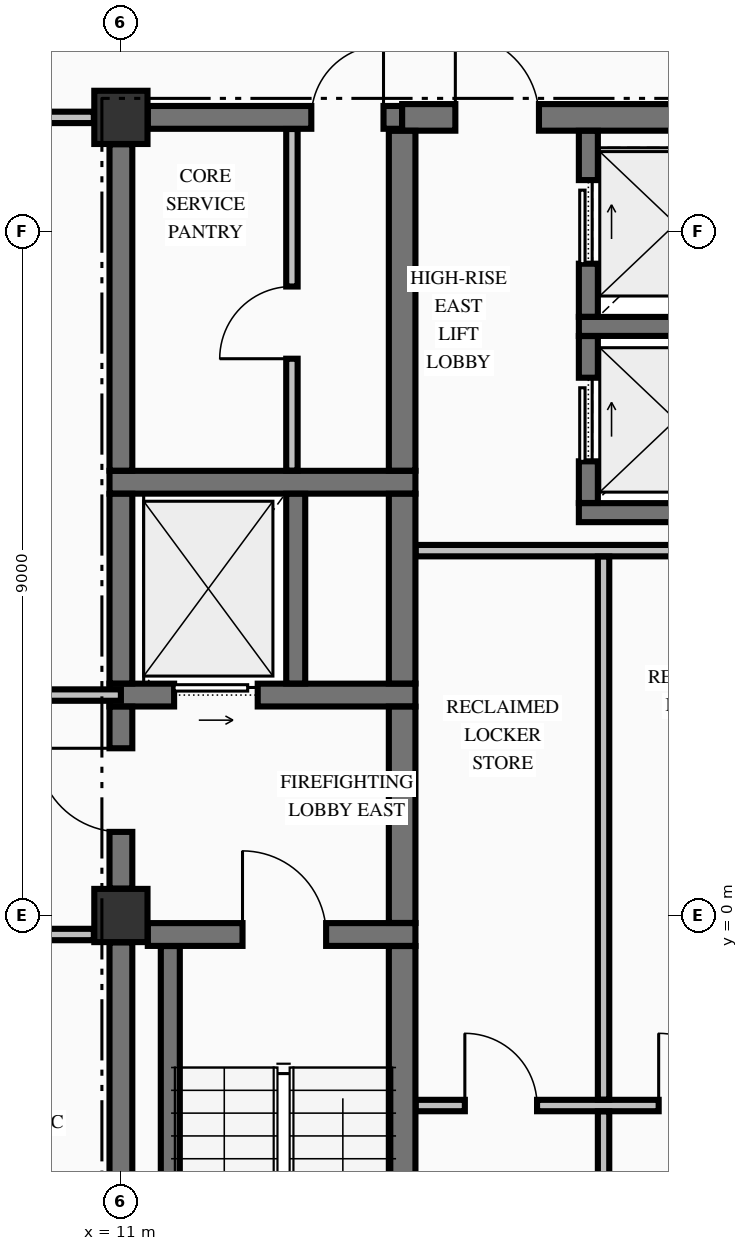
"""IFC4 building model, lengths in metres.
Left out: names, types, materials, properties, quantities, classifications, styles, units other than length and angle.
Written with IfcOpenShell. Run it as: python <this file> out.ifc"""

import sys

from ifc_helpers import new_model, si_unit, direction, frame, frame_2d, origin, origin_2d, place, context, subcontext, project, spatial, rectangle, extrude, element, fill, save


model = new_model("IFC4")
c1 = context("Model", 3, precision=1e-05, world=origin(), true_north=direction((0.0, 1.0)))
c2 = subcontext(c1, "Body", "Model", "MODEL_VIEW")
j1 = project(units=[si_unit("LENGTHUNIT", "METRE"), si_unit("PLANEANGLEUNIT", "RADIAN")], contexts=[c1])
p1 = place(None, origin())
s1 = spatial("IfcSite", under=j1, at=p1, CompositionType="ELEMENT")
p2 = place(p1, origin())
s2 = spatial("IfcBuilding", under=s1, at=p2, CompositionType="ELEMENT")
p3 = place(p2, frame((0.0, 0.0, 230.05)))
s3 = spatial("IfcBuildingStorey", under=s2, at=p3, CompositionType="ELEMENT", Elevation=230.05)
for number, where, z_axis, x_axis in (
    (1, (11.0, 0.0, -0.25), (0.0, 0.0, 1.0), (1.0, 0.0, 0.0)),
    (2, (11.0, 10.5, -0.25), (0.0, 0.0, 1.0), (1.0, 0.0, 0.0)),
):
    element("IfcColumn", number, at=place(p3, frame(where, z_axis=z_axis, x_axis=x_axis)), inside=s3, PredefinedType="COLUMN", context=c2, shape_type="SweptSolid", body=[
        extrude(rectangle(XDim=0.7, YDim=0.7, at=origin_2d()), origin(), (0.0, 0.0, 1.0), 3.23),
    ])
p4 = place(p3, frame((11.354, -0.25, 0.0), z_axis=(0.0, 0.0, 1.0), x_axis=(1.0, 0.0, 0.0)))
e3 = element("IfcWall", 3, at=p4, inside=s3, PredefinedType="SHEAR", context=c2, shape_type="SweptSolid", body=[
    extrude(rectangle(XDim=3.521, YDim=0.3, at=frame_2d((1.76, 0.0))), origin(), (0.0, 0.0, 1.0), 2.98),
])
p5 = place(p4, frame((1.246, 0.0, 0.0)))
e4 = element("IfcOpeningElement", 4, at=p5, cuts=e3, PredefinedType="OPENING", context=c2, shape_type="SweptSolid", body=[
    extrude(rectangle(XDim=1.1, YDim=2.15, at=frame_2d((0.55, 1.075))), frame((0.0, 0.16, 0.0), z_axis=(0.0, -1.0, 0.0), x_axis=(1.0, 0.0, 0.0)), (0.0, 0.0, 1.0), 0.32),
])
p6 = place(p3, frame((10.85, 2.9, 0.0), z_axis=(0.0, 0.0, 1.0), x_axis=(1.0, 0.0, 0.0)))
e5 = element("IfcWall", 5, at=p6, inside=s3, PredefinedType="SHEAR", context=c2, shape_type="SweptSolid", body=[
    extrude(rectangle(XDim=4.025, YDim=0.3, at=frame_2d((2.012, 0.0))), origin(), (0.0, 0.0, 1.0), 2.98),
])
p7 = place(p6, frame((0.85, 0.0, 0.0)))
e6 = element("IfcOpeningElement", 6, at=p7, cuts=e5, PredefinedType="OPENING", context=c2, shape_type="SweptSolid", body=[
    extrude(rectangle(XDim=1.1, YDim=2.2, at=frame_2d((0.55, 1.1))), frame((0.0, 0.16, 0.0), z_axis=(0.0, -1.0, 0.0), x_axis=(1.0, 0.0, 0.0)), (0.0, 0.0, 1.0), 0.32),
])
p8 = place(p3, frame((17.025, 5.3, 0.0), z_axis=(0.0, 0.0, 1.0), x_axis=(1.0, 0.0, 0.0)))
e7 = element("IfcWall", 7, at=p8, inside=s3, PredefinedType="SOLIDWALL", context=c2, shape_type="SweptSolid", body=[
    extrude(rectangle(XDim=3.15, YDim=0.25, at=frame_2d((1.575, 0.0))), origin(), (0.0, 0.0, 1.0), 2.98),
])
p9 = place(p3, frame((10.85, 5.7, 0.0), z_axis=(0.0, 0.0, 1.0), x_axis=(1.0, 0.0, 0.0)))
e8 = element("IfcWall", 8, at=p9, inside=s3, PredefinedType="SHEAR", context=c2, shape_type="SweptSolid", body=[
    extrude(rectangle(XDim=4.025, YDim=0.3, at=frame_2d((2.012, 0.0))), origin(), (0.0, 0.0, 1.0), 2.98),
])
p10 = place(p3, frame((17.025, 7.75, 0.0), z_axis=(0.0, 0.0, 1.0), x_axis=(1.0, 0.0, 0.0)))
e9 = element("IfcWall", 9, at=p10, inside=s3, PredefinedType="SOLIDWALL", context=c2, shape_type="SweptSolid", body=[
    extrude(rectangle(XDim=3.15, YDim=0.25, at=frame_2d((1.575, 0.0))), origin(), (0.0, 0.0, 1.0), 2.98),
])
p11 = place(p3, frame((11.354, 10.5, 0.0), z_axis=(0.0, 0.0, 1.0), x_axis=(1.0, 0.0, 0.0)))
e10 = element("IfcWall", 10, at=p11, inside=s3, PredefinedType="SHEAR", context=c2, shape_type="SweptSolid", body=[
    extrude(rectangle(XDim=3.346, YDim=0.3, at=frame_2d((1.673, 0.0))), origin(), (0.0, 0.0, 1.0), 2.98),
])
p12 = place(p11, frame((2.151, 0.0, 0.0)))
e11 = element("IfcOpeningElement", 11, at=p12, cuts=e10, PredefinedType="OPENING", context=c2, shape_type="SweptSolid", body=[
    extrude(rectangle(XDim=0.95, YDim=2.15, at=frame_2d((0.475, 1.075))), frame((0.0, 0.16, 0.0), z_axis=(0.0, -1.0, 0.0), x_axis=(1.0, 0.0, 0.0)), (0.0, 0.0, 1.0), 0.32),
])
p13 = place(p3, frame((14.7, 10.5, 0.0), z_axis=(0.0, 0.0, 1.0), x_axis=(1.0, 0.0, 0.0)))
e12 = element("IfcWall", 12, at=p13, inside=s3, PredefinedType="SHEAR", context=c2, shape_type="SweptSolid", body=[
    extrude(rectangle(XDim=4.946, YDim=0.35, at=frame_2d((2.473, 0.0))), origin(), (0.0, 0.0, 1.0), 2.98),
])
p14 = place(p13, frame((0.7, 0.0, 0.0)))
e13 = element("IfcOpeningElement", 13, at=p14, cuts=e12, PredefinedType="OPENING", context=c2, shape_type="SweptSolid", body=[
    extrude(rectangle(XDim=1.1, YDim=2.15, at=frame_2d((0.55, 1.075))), frame((0.0, 0.185, 0.0), z_axis=(0.0, -1.0, 0.0), x_axis=(1.0, 0.0, 0.0)), (0.0, 0.0, 1.0), 0.37),
])
p15 = place(p3, frame((14.878, -2.5, 0.0), z_axis=(0.0, 0.0, 1.0), x_axis=(1.0, 0.0, 0.0)))
e14 = element("IfcWall", 14, at=p15, inside=s3, PredefinedType="PARTITIONING", context=c2, shape_type="SweptSolid", body=[
    extrude(rectangle(XDim=4.944, YDim=0.15, at=frame_2d((2.472, 0.0))), origin(), (0.0, 0.0, 1.0), 2.98),
])
p16 = place(p15, frame((0.647, 0.0, 0.0)))
e15 = element("IfcOpeningElement", 15, at=p16, cuts=e14, PredefinedType="OPENING", context=c2, shape_type="SweptSolid", body=[
    extrude(rectangle(XDim=0.95, YDim=2.15, at=frame_2d((0.475, 1.075))), frame((0.0, 0.085, 0.0), z_axis=(0.0, -1.0, 0.0), x_axis=(1.0, 0.0, 0.0)), (0.0, 0.0, 1.0), 0.17),
])
p17 = place(p15, frame((3.197, 0.0, 0.0)))
e16 = element("IfcOpeningElement", 16, at=p17, cuts=e14, PredefinedType="OPENING", context=c2, shape_type="SweptSolid", body=[
    extrude(rectangle(XDim=0.95, YDim=2.15, at=frame_2d((0.475, 1.075))), frame((0.0, 0.085, 0.0), z_axis=(0.0, -1.0, 0.0), x_axis=(1.0, 0.0, 0.0)), (0.0, 0.0, 1.0), 0.17),
])
p18 = place(p3, frame((-10.644, -0.25, 0.0), z_axis=(0.0, 0.0, 1.0), x_axis=(1.0, 0.0, 0.0)))
e17 = element("IfcWall", 17, at=p18, inside=s3, PredefinedType="PARTITIONING", context=c2, shape_type="SweptSolid", body=[
    extrude(rectangle(XDim=21.288, YDim=0.15, at=frame_2d((10.644, 0.0))), origin(), (0.0, 0.0, 1.0), 2.98),
])
p19 = place(p18, frame((6.394, 0.0, 0.0)))
e18 = element("IfcOpeningElement", 18, at=p19, cuts=e17, PredefinedType="OPENING", context=c2, shape_type="SweptSolid", body=[
    extrude(rectangle(XDim=1.1, YDim=2.15, at=frame_2d((0.55, 1.075))), frame((0.0, 0.085, 0.0), z_axis=(0.0, -1.0, 0.0), x_axis=(1.0, 0.0, 0.0)), (0.0, 0.0, 1.0), 0.17),
])
p20 = place(p18, frame((2.219, 0.0, 0.0)))
e19 = element("IfcOpeningElement", 19, at=p20, cuts=e17, PredefinedType="OPENING", context=c2, shape_type="SweptSolid", body=[
    extrude(rectangle(XDim=1.05, YDim=2.15, at=frame_2d((0.525, 1.075))), frame((0.0, 0.085, 0.0), z_axis=(0.0, -1.0, 0.0), x_axis=(1.0, 0.0, 0.0)), (0.0, 0.0, 1.0), 0.17),
])
p21 = place(p18, frame((14.369, 0.0, 0.0)))
e20 = element("IfcOpeningElement", 20, at=p21, cuts=e17, PredefinedType="OPENING", context=c2, shape_type="SweptSolid", body=[
    extrude(rectangle(XDim=0.95, YDim=2.15, at=frame_2d((0.475, 1.075))), frame((0.0, 0.085, 0.0), z_axis=(0.0, -1.0, 0.0), x_axis=(1.0, 0.0, 0.0)), (0.0, 0.0, 1.0), 0.17),
])
p22 = place(p3, frame((-11.0, 2.9, 0.0), z_axis=(0.0, 0.0, 1.0), x_axis=(1.0, 0.0, 0.0)))
e21 = element("IfcWall", 21, at=p22, inside=s3, PredefinedType="PARTITIONING", context=c2, shape_type="SweptSolid", body=[
    extrude(rectangle(XDim=22.0, YDim=0.15, at=frame_2d((11.0, 0.0))), origin(), (0.0, 0.0, 1.0), 2.98),
])
p23 = place(p22, frame((6.75, 0.0, 0.0)))
e22 = element("IfcOpeningElement", 22, at=p23, cuts=e21, PredefinedType="OPENING", context=c2, shape_type="SweptSolid", body=[
    extrude(rectangle(XDim=1.1, YDim=2.15, at=frame_2d((0.55, 1.075))), frame((0.0, 0.085, 0.0), z_axis=(0.0, -1.0, 0.0), x_axis=(1.0, 0.0, 0.0)), (0.0, 0.0, 1.0), 0.17),
])
p24 = place(p22, frame((2.575, 0.0, 0.0)))
e23 = element("IfcOpeningElement", 23, at=p24, cuts=e21, PredefinedType="OPENING", context=c2, shape_type="SweptSolid", body=[
    extrude(rectangle(XDim=1.05, YDim=2.15, at=frame_2d((0.525, 1.075))), frame((0.0, 0.085, 0.0), z_axis=(0.0, -1.0, 0.0), x_axis=(1.0, 0.0, 0.0)), (0.0, 0.0, 1.0), 0.17),
])
p25 = place(p22, frame((14.65, 0.0, 0.0)))
e24 = element("IfcOpeningElement", 24, at=p25, cuts=e21, PredefinedType="OPENING", context=c2, shape_type="SweptSolid", body=[
    extrude(rectangle(XDim=1.1, YDim=2.15, at=frame_2d((0.55, 1.075))), frame((0.0, 0.085, 0.0), z_axis=(0.0, -1.0, 0.0), x_axis=(1.0, 0.0, 0.0)), (0.0, 0.0, 1.0), 0.17),
])
p26 = place(p3, frame((14.878, 4.8, 0.0), z_axis=(0.0, 0.0, 1.0), x_axis=(1.0, 0.0, 0.0)))
e25 = element("IfcWall", 25, at=p26, inside=s3, PredefinedType="PARTITIONING", context=c2, shape_type="SweptSolid", body=[
    extrude(rectangle(XDim=4.944, YDim=0.15, at=frame_2d((2.472, 0.0))), origin(), (0.0, 0.0, 1.0), 2.98),
])
p27 = place(p3, frame((-10.644, 10.5, 0.0), z_axis=(0.0, 0.0, 1.0), x_axis=(1.0, 0.0, 0.0)))
e26 = element("IfcWall", 26, at=p27, inside=s3, PredefinedType="PARTITIONING", context=c2, shape_type="SweptSolid", body=[
    extrude(rectangle(XDim=21.288, YDim=0.15, at=frame_2d((10.644, 0.0))), origin(), (0.0, 0.0, 1.0), 2.98),
])
p28 = place(p27, frame((6.394, 0.0, 0.0)))
e27 = element("IfcOpeningElement", 27, at=p28, cuts=e26, PredefinedType="OPENING", context=c2, shape_type="SweptSolid", body=[
    extrude(rectangle(XDim=1.1, YDim=2.15, at=frame_2d((0.55, 1.075))), frame((0.0, 0.085, 0.0), z_axis=(0.0, -1.0, 0.0), x_axis=(1.0, 0.0, 0.0)), (0.0, 0.0, 1.0), 0.17),
])
p29 = place(p3, frame((11.0, -9.596, 0.0), z_axis=(0.0, 0.0, 1.0), x_axis=(0.0, 1.0, 0.0)))
e28 = element("IfcWall", 28, at=p29, inside=s3, PredefinedType="SHEAR", context=c2, shape_type="SweptSolid", body=[
    extrude(rectangle(XDim=9.242, YDim=0.3, at=frame_2d((4.621, 0.0))), origin(), (0.0, 0.0, 1.0), 2.98),
])
p30 = place(p3, frame((11.0, 0.354, 0.0), z_axis=(0.0, 0.0, 1.0), x_axis=(0.0, 1.0, 0.0)))
e29 = element("IfcWall", 29, at=p30, inside=s3, PredefinedType="SHEAR", context=c2, shape_type="SweptSolid", body=[
    extrude(rectangle(XDim=2.394, YDim=0.3, at=frame_2d((1.197, 0.0))), origin(), (0.0, 0.0, 1.0), 2.98),
])
p31 = place(p30, frame((0.746, 0.0, 0.0)))
e30 = element("IfcOpeningElement", 30, at=p31, cuts=e29, PredefinedType="OPENING", context=c2, shape_type="SweptSolid", body=[
    extrude(rectangle(XDim=1.1, YDim=2.15, at=frame_2d((0.55, 1.075))), frame((0.0, 0.16, 0.0), z_axis=(0.0, -1.0, 0.0), x_axis=(1.0, 0.0, 0.0)), (0.0, 0.0, 1.0), 0.32),
])
p32 = place(p3, frame((11.0, 3.052, 0.0), z_axis=(0.0, 0.0, 1.0), x_axis=(0.0, 1.0, 0.0)))
e31 = element("IfcWall", 31, at=p32, inside=s3, PredefinedType="SHEAR", context=c2, shape_type="SweptSolid", body=[
    extrude(rectangle(XDim=2.496, YDim=0.3, at=frame_2d((1.248, 0.0))), origin(), (0.0, 0.0, 1.0), 2.98),
])
p33 = place(p3, frame((11.0, 5.852, 0.0), z_axis=(0.0, 0.0, 1.0), x_axis=(0.0, 1.0, 0.0)))
e32 = element("IfcWall", 32, at=p33, inside=s3, PredefinedType="SHEAR", context=c2, shape_type="SweptSolid", body=[
    extrude(rectangle(XDim=4.294, YDim=0.3, at=frame_2d((2.147, 0.0))), origin(), (0.0, 0.0, 1.0), 2.98),
])
p34 = place(p3, frame((11.65, -9.798, 0.0), z_axis=(0.0, 0.0, 1.0), x_axis=(0.0, 1.0, 0.0)))
e33 = element("IfcWall", 33, at=p34, inside=s3, PredefinedType="SOLIDWALL", context=c2, shape_type="SweptSolid", body=[
    extrude(rectangle(XDim=9.396, YDim=0.25, at=frame_2d((4.698, 0.0))), origin(), (0.0, 0.0, 1.0), 2.98),
])
p35 = place(p3, frame((13.3, 3.052, 0.0), z_axis=(0.0, 0.0, 1.0), x_axis=(0.0, 1.0, 0.0)))
e34 = element("IfcWall", 34, at=p35, inside=s3, PredefinedType="SOLIDWALL", context=c2, shape_type="SweptSolid", body=[
    extrude(rectangle(XDim=2.496, YDim=0.25, at=frame_2d((1.248, 0.0))), origin(), (0.0, 0.0, 1.0), 2.98),
])
p36 = place(p3, frame((14.7, -9.773, 0.0), z_axis=(0.0, 0.0, 1.0), x_axis=(0.0, 1.0, 0.0)))
e35 = element("IfcWall", 35, at=p36, inside=s3, PredefinedType="SHEAR", context=c2, shape_type="SweptSolid", body=[
    extrude(rectangle(XDim=9.371, YDim=0.35, at=frame_2d((4.686, 0.0))), origin(), (0.0, 0.0, 1.0), 2.98),
])
p37 = place(p3, frame((14.7, -0.098, 0.0), z_axis=(0.0, 0.0, 1.0), x_axis=(0.0, 1.0, 0.0)))
e36 = element("IfcWall", 36, at=p37, inside=s3, PredefinedType="SHEAR", context=c2, shape_type="SweptSolid", body=[
    extrude(rectangle(XDim=2.846, YDim=0.35, at=frame_2d((1.423, 0.0))), origin(), (0.0, 0.0, 1.0), 2.98),
])
p38 = place(p3, frame((14.7, 3.052, 0.0), z_axis=(0.0, 0.0, 1.0), x_axis=(0.0, 1.0, 0.0)))
e37 = element("IfcWall", 37, at=p38, inside=s3, PredefinedType="SHEAR", context=c2, shape_type="SweptSolid", body=[
    extrude(rectangle(XDim=2.496, YDim=0.35, at=frame_2d((1.248, 0.0))), origin(), (0.0, 0.0, 1.0), 2.98),
])
p39 = place(p3, frame((14.7, 5.852, 0.0), z_axis=(0.0, 0.0, 1.0), x_axis=(0.0, 1.0, 0.0)))
e38 = element("IfcWall", 38, at=p39, inside=s3, PredefinedType="SHEAR", context=c2, shape_type="SweptSolid", body=[
    extrude(rectangle(XDim=4.471, YDim=0.35, at=frame_2d((2.235, 0.0))), origin(), (0.0, 0.0, 1.0), 2.98),
])
p40 = place(p3, frame((17.15, 5.427, 0.0), z_axis=(0.0, 0.0, 1.0), x_axis=(0.0, 1.0, 0.0)))
e39 = element("IfcWall", 39, at=p40, inside=s3, PredefinedType="SOLIDWALL", context=c2, shape_type="SweptSolid", body=[
    extrude(rectangle(XDim=2.196, YDim=0.25, at=frame_2d((1.098, 0.0))), origin(), (0.0, 0.0, 1.0), 2.98),
])
p41 = place(p40, frame((0.548, 0.0, 0.0)))
e40 = element("IfcOpeningElement", 40, at=p41, cuts=e39, PredefinedType="OPENING", context=c2, shape_type="SweptSolid", body=[
    extrude(rectangle(XDim=1.1, YDim=2.2, at=frame_2d((0.55, 1.1))), frame((0.0, 0.135, 0.0), z_axis=(0.0, -1.0, 0.0), x_axis=(1.0, 0.0, 0.0)), (0.0, 0.0, 1.0), 0.27),
])
p42 = place(p3, frame((17.15, 7.877, 0.0), z_axis=(0.0, 0.0, 1.0), x_axis=(0.0, 1.0, 0.0)))
e41 = element("IfcWall", 41, at=p42, inside=s3, PredefinedType="SOLIDWALL", context=c2, shape_type="SweptSolid", body=[
    extrude(rectangle(XDim=2.446, YDim=0.25, at=frame_2d((1.223, 0.0))), origin(), (0.0, 0.0, 1.0), 2.98),
])
p43 = place(p42, frame((0.698, 0.0, 0.0)))
e42 = element("IfcOpeningElement", 42, at=p43, cuts=e41, PredefinedType="OPENING", context=c2, shape_type="SweptSolid", body=[
    extrude(rectangle(XDim=1.1, YDim=2.2, at=frame_2d((0.55, 1.1))), frame((0.0, 0.135, 0.0), z_axis=(0.0, -1.0, 0.0), x_axis=(1.0, 0.0, 0.0)), (0.0, 0.0, 1.0), 0.27),
])
p44 = place(p3, frame((13.25, 5.853, 0.0), z_axis=(0.0, 0.0, 1.0), x_axis=(0.0, 1.0, 0.0)))
e43 = element("IfcWall", 43, at=p44, inside=s3, PredefinedType="PARTITIONING", context=c2, shape_type="SweptSolid", body=[
    extrude(rectangle(XDim=4.494, YDim=0.15, at=frame_2d((2.247, 0.0))), origin(), (0.0, 0.0, 1.0), 2.98),
])
p45 = place(p44, frame((1.472, 0.0, 0.0)))
e44 = element("IfcOpeningElement", 44, at=p45, cuts=e43, PredefinedType="OPENING", context=c2, shape_type="SweptSolid", body=[
    extrude(rectangle(XDim=0.95, YDim=2.15, at=frame_2d((0.475, 1.075))), frame((0.0, 0.085, 0.0), z_axis=(0.0, -1.0, 0.0), x_axis=(1.0, 0.0, 0.0)), (0.0, 0.0, 1.0), 0.17),
])
p46 = place(p3, frame((17.35, -9.772, 0.0), z_axis=(0.0, 0.0, 1.0), x_axis=(0.0, 1.0, 0.0)))
e45 = element("IfcWall", 45, at=p46, inside=s3, PredefinedType="PARTITIONING", context=c2, shape_type="SweptSolid", body=[
    extrude(rectangle(XDim=7.194, YDim=0.15, at=frame_2d((3.597, 0.0))), origin(), (0.0, 0.0, 1.0), 2.98),
])
p47 = place(p3, frame((17.35, -2.422, 0.0), z_axis=(0.0, 0.0, 1.0), x_axis=(0.0, 1.0, 0.0)))
e46 = element("IfcWall", 46, at=p47, inside=s3, PredefinedType="PARTITIONING", context=c2, shape_type="SweptSolid", body=[
    extrude(rectangle(XDim=7.144, YDim=0.15, at=frame_2d((3.572, 0.0))), origin(), (0.0, 0.0, 1.0), 2.98),
])
p48 = place(p5, origin())
e47 = element("IfcDoor", 47, at=p48, inside=s3, OperationType="SINGLE_SWING_LEFT", PredefinedType="DOOR", context=c2, shape_type="SweptSolid", body=[
    extrude(rectangle(XDim=1.1, YDim=2.15, at=frame_2d((0.55, 1.075))), frame((0.0, 0.025, 0.0), z_axis=(0.0, -1.0, 0.0), x_axis=(1.0, 0.0, 0.0)), (0.0, 0.0, 1.0), 0.05),
])
fill(e4, e47)
p49 = place(p31, origin())
e48 = element("IfcDoor", 48, at=p49, inside=s3, OperationType="SINGLE_SWING_RIGHT", PredefinedType="DOOR", context=c2, shape_type="SweptSolid", body=[
    extrude(rectangle(XDim=1.1, YDim=2.15, at=frame_2d((0.55, 1.075))), frame((0.0, 0.025, 0.0), z_axis=(0.0, -1.0, 0.0), x_axis=(1.0, 0.0, 0.0)), (0.0, 0.0, 1.0), 0.05),
])
fill(e30, e48)
p50 = place(p7, origin())
e49 = element("IfcDoor", 49, at=p50, inside=s3, OperationType="SLIDING_TO_RIGHT", PredefinedType="DOOR", context=c2, shape_type="SweptSolid", body=[
    extrude(rectangle(XDim=1.1, YDim=2.2, at=frame_2d((0.55, 1.1))), frame((0.0, 0.025, 0.0), z_axis=(0.0, -1.0, 0.0), x_axis=(1.0, 0.0, 0.0)), (0.0, 0.0, 1.0), 0.05),
])
fill(e6, e49)
p51 = place(p12, origin())
e50 = element("IfcDoor", 50, at=p51, inside=s3, OperationType="SINGLE_SWING_RIGHT", PredefinedType="DOOR", context=c2, shape_type="SweptSolid", body=[
    extrude(rectangle(XDim=0.95, YDim=2.15, at=frame_2d((0.475, 1.075))), frame((0.0, 0.025, 0.0), z_axis=(0.0, -1.0, 0.0), x_axis=(1.0, 0.0, 0.0)), (0.0, 0.0, 1.0), 0.05),
])
fill(e11, e50)
p52 = place(p45, origin())
e51 = element("IfcDoor", 51, at=p52, inside=s3, OperationType="SINGLE_SWING_LEFT", PredefinedType="DOOR", context=c2, shape_type="SweptSolid", body=[
    extrude(rectangle(XDim=0.95, YDim=2.15, at=frame_2d((0.475, 1.075))), frame((0.0, 0.025, 0.0), z_axis=(0.0, -1.0, 0.0), x_axis=(1.0, 0.0, 0.0)), (0.0, 0.0, 1.0), 0.05),
])
fill(e44, e51)
p53 = place(p41, origin())
e52 = element("IfcDoor", 52, at=p53, inside=s3, OperationType="SLIDING_TO_RIGHT", PredefinedType="DOOR", context=c2, shape_type="SweptSolid", body=[
    extrude(rectangle(XDim=1.1, YDim=2.2, at=frame_2d((0.55, 1.1))), frame((0.0, 0.025, 0.0), z_axis=(0.0, -1.0, 0.0), x_axis=(1.0, 0.0, 0.0)), (0.0, 0.0, 1.0), 0.05),
])
fill(e40, e52)
p54 = place(p43, origin())
e53 = element("IfcDoor", 53, at=p54, inside=s3, OperationType="SLIDING_TO_RIGHT", PredefinedType="DOOR", context=c2, shape_type="SweptSolid", body=[
    extrude(rectangle(XDim=1.1, YDim=2.2, at=frame_2d((0.55, 1.1))), frame((0.0, 0.025, 0.0), z_axis=(0.0, -1.0, 0.0), x_axis=(1.0, 0.0, 0.0)), (0.0, 0.0, 1.0), 0.05),
])
fill(e42, e53)
p55 = place(p14, origin())
e54 = element("IfcDoor", 54, at=p55, inside=s3, OperationType="SINGLE_SWING_LEFT", PredefinedType="DOOR", context=c2, shape_type="SweptSolid", body=[
    extrude(rectangle(XDim=1.1, YDim=2.15, at=frame_2d((0.55, 1.075))), frame((0.0, 0.025, 0.0), z_axis=(0.0, -1.0, 0.0), x_axis=(1.0, 0.0, 0.0)), (0.0, 0.0, 1.0), 0.05),
])
fill(e13, e54)
p56 = place(p16, origin())
e55 = element("IfcDoor", 55, at=p56, inside=s3, OperationType="SINGLE_SWING_LEFT", PredefinedType="DOOR", context=c2, shape_type="SweptSolid", body=[
    extrude(rectangle(XDim=0.95, YDim=2.15, at=frame_2d((0.475, 1.075))), frame((0.0, 0.025, 0.0), z_axis=(0.0, -1.0, 0.0), x_axis=(1.0, 0.0, 0.0)), (0.0, 0.0, 1.0), 0.05),
])
fill(e15, e55)
p57 = place(p17, origin())
e56 = element("IfcDoor", 56, at=p57, inside=s3, OperationType="SINGLE_SWING_LEFT", PredefinedType="DOOR", context=c2, shape_type="SweptSolid", body=[
    extrude(rectangle(XDim=0.95, YDim=2.15, at=frame_2d((0.475, 1.075))), frame((0.0, 0.025, 0.0), z_axis=(0.0, -1.0, 0.0), x_axis=(1.0, 0.0, 0.0)), (0.0, 0.0, 1.0), 0.05),
])
fill(e16, e56)
save(model, sys.argv[1])
